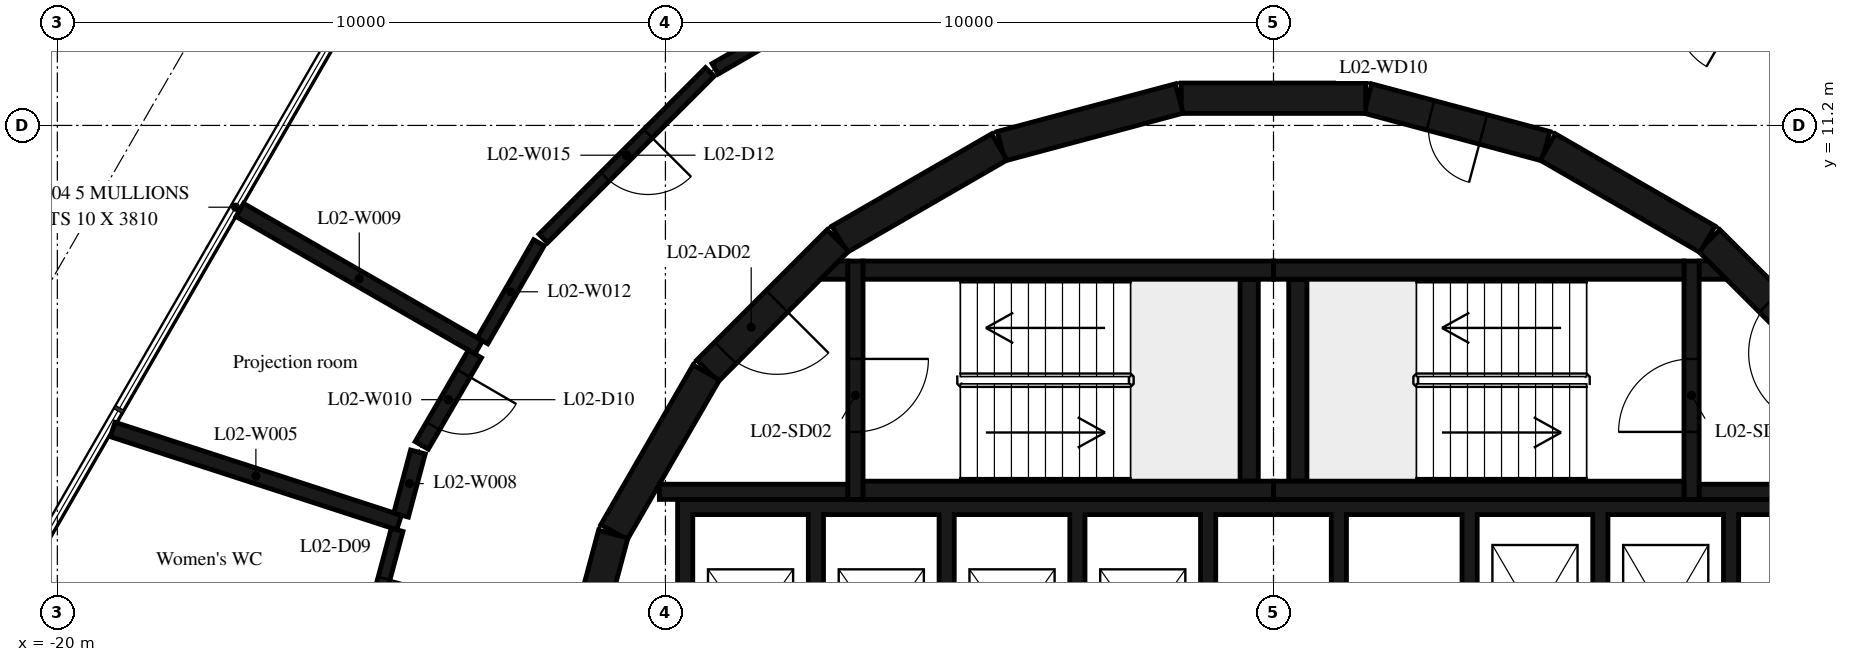
"""IFC4 building model, lengths in metres.
Left out: names, types, materials, properties, quantities, classifications, styles, units other than length and angle.
Written with IfcOpenShell. Run it as: python <this file> out.ifc"""

import sys

from ifc_helpers import new_model, si_unit, direction, frame, frame_2d, origin, place, context, subcontext, project, spatial, polyline, rectangle, outline, extrude, element, fill, save


model = new_model("IFC4")
c1 = context("Model", 3, precision=1e-05, world=origin(), true_north=direction((0.0, 1.0)))
c2 = subcontext(c1, "Body", "Model", "MODEL_VIEW")
j1 = project(units=[si_unit("LENGTHUNIT", "METRE"), si_unit("PLANEANGLEUNIT", "RADIAN")], contexts=[c1])
p1 = place(None, origin())
s1 = spatial("IfcSite", under=j1, at=p1, CompositionType="ELEMENT")
p2 = place(p1, origin())
s2 = spatial("IfcBuilding", under=s1, at=p2, CompositionType="ELEMENT")
p3 = place(p2, frame((0.0, 0.0, 13.8)))
s3 = spatial("IfcBuildingStorey", under=s2, at=p3, CompositionType="ELEMENT", Elevation=13.8)
p4 = place(p3, frame((9.308, 7.164, 0.0), z_axis=(0.0, 0.0, 1.0), x_axis=(-0.707106781187, 0.707106781187, 0.0)))
e1 = element("IfcWall", 1, at=p4, inside=s3, PredefinedType="SHEAR", context=c2, shape_type="SweptSolid", body=[
    extrude(rectangle(XDim=3.032, YDim=0.5, at=frame_2d((1.516, 0.0))), origin(), (0.0, 0.0, 1.0), 4.42),
])
p5 = place(p4, frame((0.416, 0.0, 0.0)))
e2 = element("IfcOpeningElement", 2, at=p5, cuts=e1, PredefinedType="OPENING", context=c2, shape_type="SweptSolid", body=[
    extrude(rectangle(XDim=1.2, YDim=2.1, at=frame_2d((0.6, 1.05))), frame((0.0, 0.26, 0.0), z_axis=(0.0, -1.0, 0.0), x_axis=(1.0, 0.0, 0.0)), (0.0, 0.0, 1.0), 0.52),
])
p6 = place(p3, frame((7.137, 9.329, 0.0), z_axis=(0.0, 0.0, 1.0), x_axis=(-0.865975092491, 0.500087131594, 0.0)))
e3 = element("IfcWall", 3, at=p6, inside=s3, PredefinedType="SHEAR", context=c2, shape_type="SweptSolid", body=[
    extrude(rectangle(XDim=3.033, YDim=0.5, at=frame_2d((1.516, 0.0))), origin(), (0.0, 0.0, 1.0), 4.42),
])
p7 = place(p3, frame((4.479, 10.858, 0.0), z_axis=(0.0, 0.0, 1.0), x_axis=(-0.965948410781, 0.258734743916, 0.0)))
e4 = element("IfcWall", 4, at=p7, inside=s3, PredefinedType="SHEAR", context=c2, shape_type="SweptSolid", body=[
    extrude(rectangle(XDim=3.033, YDim=0.5, at=frame_2d((1.516, 0.0))), origin(), (0.0, 0.0, 1.0), 4.42),
])
p8 = place(p7, frame((1.066, 0.0, 0.0)))
e5 = element("IfcOpeningElement", 5, at=p8, cuts=e4, PredefinedType="OPENING", context=c2, shape_type="SweptSolid", body=[
    extrude(rectangle(XDim=0.9, YDim=2.1, at=frame_2d((0.45, 1.05))), frame((0.0, 0.26, 0.0), z_axis=(0.0, -1.0, 0.0), x_axis=(1.0, 0.0, 0.0)), (0.0, 0.0, 1.0), 0.52),
])
for number, where, z_axis, x_axis in (
    (6, (1.516, 11.647, 0.0), (0.0, 0.0, 1.0), (-1.0, 0.0, 0.0)),
    (7, (-1.55, 11.643, 0.0), (0.0, 0.0, 1.0), (-0.966, -0.259, 0.0)),
    (8, (-4.51, 10.845, 0.0), (0.0, 0.0, 1.0), (-0.866, -0.5, 0.0)),
):
    element("IfcWall", number, at=place(p3, frame(where, z_axis=z_axis, x_axis=x_axis)), inside=s3, PredefinedType="SHEAR", context=c2, shape_type="SweptSolid", body=[
        extrude(rectangle(XDim=3.033, YDim=0.5, at=frame_2d((1.516, 0.0))), origin(), (0.0, 0.0, 1.0), 4.42),
    ])
p9 = place(p3, frame((-7.164, 9.308, 0.0), z_axis=(0.0, 0.0, 1.0), x_axis=(-0.707106781187, -0.707106781187, 0.0)))
e9 = element("IfcWall", 9, at=p9, inside=s3, PredefinedType="SHEAR", context=c2, shape_type="SweptSolid", body=[
    extrude(rectangle(XDim=3.032, YDim=0.5, at=frame_2d((1.516, 0.0))), origin(), (0.0, 0.0, 1.0), 4.42),
])
p10 = place(p9, frame((1.416, 0.0, 0.0)))
e10 = element("IfcOpeningElement", 10, at=p10, cuts=e9, PredefinedType="OPENING", context=c2, shape_type="SweptSolid", body=[
    extrude(rectangle(XDim=1.2, YDim=2.1, at=frame_2d((0.6, 1.05))), frame((0.0, 0.26, 0.0), z_axis=(0.0, -1.0, 0.0), x_axis=(1.0, 0.0, 0.0)), (0.0, 0.0, 1.0), 0.52),
])
for number, where, z_axis, x_axis in (
    (11, (-9.329, 7.137, 0.0), (0.0, 0.0, 1.0), (-0.5, -0.866, 0.0)),
    (12, (-10.858, 4.479, 0.0), (0.0, 0.0, 1.0), (-0.259, -0.966, 0.0)),
):
    element("IfcWall", number, at=place(p3, frame(where, z_axis=z_axis, x_axis=x_axis)), inside=s3, PredefinedType="SHEAR", context=c2, shape_type="SweptSolid", body=[
        extrude(rectangle(XDim=3.033, YDim=0.5, at=frame_2d((1.516, 0.0))), origin(), (0.0, 0.0, 1.0), 4.42),
    ])
for number, where, z_axis, x_axis in (
    (13, (0.0, 5.2, 0.0), (0.0, 0.0, 1.0), (1.0, 0.0, 0.0)),
    (14, (0.0, 8.82, 0.0), (0.0, 0.0, 1.0), (1.0, 0.0, 0.0)),
):
    element("IfcWall", number, at=place(p3, frame(where, z_axis=z_axis, x_axis=x_axis)), inside=s3, PredefinedType="SHEAR", context=c2, shape_type="SweptSolid", body=[
        extrude(rectangle(XDim=6.75, YDim=0.3, at=frame_2d((3.375, 0.0))), origin(), (0.0, 0.0, 1.0), 4.42),
    ])
p11 = place(p3, frame((0.4, 5.35, 0.0), z_axis=(0.0, 0.0, 1.0), x_axis=(0.0, 1.0, 0.0)))
e15 = element("IfcWall", 15, at=p11, inside=s3, PredefinedType="SHEAR", context=c2, shape_type="SweptSolid", body=[
    extrude(rectangle(XDim=3.32, YDim=0.3, at=frame_2d((1.66, 0.0))), origin(), (0.0, 0.0, 1.0), 4.42),
])
p12 = place(p3, frame((6.875, 5.05, 0.0), z_axis=(0.0, 0.0, 1.0), x_axis=(0.0, 1.0, 0.0)))
e16 = element("IfcWall", 16, at=p12, inside=s3, PredefinedType="SHEAR", context=c2, shape_type="SweptSolid", body=[
    extrude(rectangle(XDim=3.92, YDim=0.25, at=frame_2d((1.96, 0.0))), origin(), (0.0, 0.0, 1.0), 4.42),
])
p13 = place(p12, frame((1.11, 0.0, 0.0)))
e17 = element("IfcOpeningElement", 17, at=p13, cuts=e16, PredefinedType="OPENING", context=c2, shape_type="SweptSolid", body=[
    extrude(rectangle(XDim=1.2, YDim=2.1, at=frame_2d((0.6, 1.05))), frame((0.0, 0.135, 0.0), z_axis=(0.0, -1.0, 0.0), x_axis=(1.0, 0.0, 0.0)), (0.0, 0.0, 1.0), 0.27),
])
p14 = place(p3, frame((7.0, 5.175, 0.0), z_axis=(0.0, 0.0, 1.0), x_axis=(1.0, 0.0, 0.0)))
e18 = element("IfcWall", 18, at=p14, inside=s3, PredefinedType="SHEAR", context=c2, shape_type="SweptSolid", body=[
    extrude(rectangle(XDim=3.1, YDim=0.25, at=frame_2d((1.55, 0.0))), origin(), (0.0, 0.0, 1.0), 4.42),
])
p15 = place(p3, origin())
e19 = element("IfcWall", 19, at=p15, inside=s3, PredefinedType="SHEAR", context=c2, shape_type="SweptSolid", body=[
    extrude(outline(polyline([(7.448, 8.67), (7.0, 8.67), (7.0, 8.97), (7.148, 8.97), (7.448, 8.67)])), origin(), (0.0, 0.0, 1.0), 4.42),
])
for number, where, z_axis, x_axis in (
    (20, (-6.75, 5.2, 0.0), (0.0, 0.0, 1.0), (1.0, 0.0, 0.0)),
    (21, (-6.75, 8.82, 0.0), (0.0, 0.0, 1.0), (1.0, 0.0, 0.0)),
):
    element("IfcWall", number, at=place(p3, frame(where, z_axis=z_axis, x_axis=x_axis)), inside=s3, PredefinedType="SHEAR", context=c2, shape_type="SweptSolid", body=[
        extrude(rectangle(XDim=6.75, YDim=0.3, at=frame_2d((3.375, 0.0))), origin(), (0.0, 0.0, 1.0), 4.42),
    ])
p16 = place(p3, frame((-0.4, 5.35, 0.0), z_axis=(0.0, 0.0, 1.0), x_axis=(0.0, 1.0, 0.0)))
e22 = element("IfcWall", 22, at=p16, inside=s3, PredefinedType="SHEAR", context=c2, shape_type="SweptSolid", body=[
    extrude(rectangle(XDim=3.32, YDim=0.3, at=frame_2d((1.66, 0.0))), origin(), (0.0, 0.0, 1.0), 4.42),
])
p17 = place(p3, frame((-6.875, 8.97, 0.0), z_axis=(0.0, 0.0, 1.0), x_axis=(0.0, -1.0, 0.0)))
e23 = element("IfcWall", 23, at=p17, inside=s3, PredefinedType="SHEAR", context=c2, shape_type="SweptSolid", body=[
    extrude(rectangle(XDim=3.92, YDim=0.25, at=frame_2d((1.96, 0.0))), origin(), (0.0, 0.0, 1.0), 4.42),
])
p18 = place(p17, frame((1.61, 0.0, 0.0)))
e24 = element("IfcOpeningElement", 24, at=p18, cuts=e23, PredefinedType="OPENING", context=c2, shape_type="SweptSolid", body=[
    extrude(rectangle(XDim=1.2, YDim=2.1, at=frame_2d((0.6, 1.05))), frame((0.0, 0.135, 0.0), z_axis=(0.0, -1.0, 0.0), x_axis=(1.0, 0.0, 0.0)), (0.0, 0.0, 1.0), 0.27),
])
p19 = place(p3, frame((-7.0, 5.175, 0.0), z_axis=(0.0, 0.0, 1.0), x_axis=(-1.0, 0.0, 0.0)))
e25 = element("IfcWall", 25, at=p19, inside=s3, PredefinedType="SHEAR", context=c2, shape_type="SweptSolid", body=[
    extrude(rectangle(XDim=3.1, YDim=0.25, at=frame_2d((1.55, 0.0))), origin(), (0.0, 0.0, 1.0), 4.42),
])
p20 = place(p3, origin())
e26 = element("IfcWall", 26, at=p20, inside=s3, PredefinedType="SHEAR", context=c2, shape_type="SweptSolid", body=[
    extrude(outline(polyline([(-7.148, 8.97), (-7.0, 8.97), (-7.0, 8.67), (-7.448, 8.67), (-7.148, 8.97)])), origin(), (0.0, 0.0, 1.0), 4.42),
])
p21 = place(p3, origin())
e27 = element("IfcWall", 27, at=p21, inside=s3, PredefinedType="SHEAR", context=c2, shape_type="SweptSolid", body=[
    extrude(outline(polyline([(-9.55, 4.8), (-7.65, 4.8), (-7.65, 1.9), (-7.4, 1.9), (-7.4, 4.8), (-5.5, 4.8), (-5.5, 1.9), (-5.25, 1.9), (-5.25, 4.8), (-3.35, 4.8), (-3.35, 1.9), (-3.1, 1.9), (-3.1, 4.8), (-1.2, 4.8), (-1.2, 1.9), (-0.95, 1.9), (-0.95, 4.8), (0.95, 4.8), (0.95, 1.9), (1.2, 1.9), (1.2, 4.8), (3.1, 4.8), (3.1, 1.9), (3.35, 1.9), (3.35, 4.8), (5.25, 4.8), (5.25, 1.9), (5.5, 1.9), (5.5, 4.8), (7.4, 4.8), (7.4, 1.9), (7.65, 1.9), (7.65, 4.8), (9.55, 4.8), (9.55, 1.9), (9.8, 1.9), (9.8, 4.8), (9.8, 5.05), (-9.8, 5.05), (-9.8, 4.8), (-9.8, 1.9), (-9.55, 1.9), (-9.55, 4.8)])), origin(), (0.0, 0.0, 1.0), 4.42),
])
p22 = place(p3, frame((-14.38, 4.67, 0.0), z_axis=(0.0, 0.0, 1.0), x_axis=(-0.951080790776, 0.308942275219, 0.0)))
e28 = element("IfcWall", 28, at=p22, inside=s3, PredefinedType="PARTITIONING", context=c2, shape_type="SweptSolid", body=[
    extrude(rectangle(XDim=4.952, YDim=0.25, at=frame_2d((2.476, 0.0))), origin(), (0.0, 0.0, 1.0), 4.03),
])
p23 = place(p3, frame((-14.412, 4.549, 0.0), z_axis=(0.0, 0.0, 1.0), x_axis=(-0.25946184252, -0.965753359961, 0.0)))
e29 = element("IfcWall", 29, at=p23, inside=s3, PredefinedType="PARTITIONING", context=c2, shape_type="SweptSolid", body=[
    extrude(rectangle(XDim=2.55, YDim=0.2, at=frame_2d((1.275, 0.0))), origin(), (0.0, 0.0, 1.0), 4.42),
])
p24 = place(p23, frame((0.825, 0.0, 0.0)))
e30 = element("IfcOpeningElement", 30, at=p24, cuts=e29, PredefinedType="OPENING", context=c2, shape_type="SweptSolid", body=[
    extrude(rectangle(XDim=0.9, YDim=2.1, at=frame_2d((0.45, 1.05))), frame((0.0, 0.11, 0.0), z_axis=(0.0, -1.0, 0.0), x_axis=(1.0, 0.0, 0.0)), (0.0, 0.0, 1.0), 0.22),
])
p25 = place(p3, frame((-14.07, 5.83, 0.0), z_axis=(0.0, 0.0, 1.0), x_axis=(-0.258044022259, -0.966133159857, 0.0)))
e31 = element("IfcWall", 31, at=p25, inside=s3, PredefinedType="PARTITIONING", context=c2, shape_type="SweptSolid", body=[
    extrude(rectangle(XDim=1.076, YDim=0.25, at=frame_2d((0.538, 0.0))), origin(), (0.0, 0.0, 1.0), 4.42),
])
p26 = place(p3, frame((-13.07, 7.55, 0.0), z_axis=(0.0, 0.0, 1.0), x_axis=(-0.866877794005, 0.498520701938, 0.0)))
e32 = element("IfcWall", 32, at=p26, inside=s3, PredefinedType="PARTITIONING", context=c2, shape_type="SweptSolid", body=[
    extrude(rectangle(XDim=4.533, YDim=0.25, at=frame_2d((2.267, 0.0))), origin(), (0.0, 0.0, 1.0), 4.42),
])
p27 = place(p3, frame((-13.133, 7.442, 0.0), z_axis=(0.0, 0.0, 1.0), x_axis=(-0.502578988357, -0.864531295247, 0.0)))
e33 = element("IfcWall", 33, at=p27, inside=s3, PredefinedType="PARTITIONING", context=c2, shape_type="SweptSolid", body=[
    extrude(rectangle(XDim=1.74, YDim=0.25, at=frame_2d((0.87, 0.0))), origin(), (0.0, 0.0, 1.0), 4.42),
])
p28 = place(p27, frame((0.37, 0.0, 0.0)))
e34 = element("IfcOpeningElement", 34, at=p28, cuts=e33, PredefinedType="OPENING", context=c2, shape_type="SweptSolid", body=[
    extrude(rectangle(XDim=1.0, YDim=2.1, at=frame_2d((0.5, 1.05))), frame((0.0, 0.135, 0.0), z_axis=(0.0, -1.0, 0.0), x_axis=(1.0, 0.0, 0.0)), (0.0, 0.0, 1.0), 0.27),
])
p29 = place(p3, frame((-12.08, 9.27, 0.0), z_axis=(0.0, 0.0, 1.0), x_axis=(-0.498809049979, -0.86671190811, 0.0)))
e35 = element("IfcWall", 35, at=p29, inside=s3, PredefinedType="PARTITIONING", context=c2, shape_type="SweptSolid", body=[
    extrude(rectangle(XDim=1.859, YDim=0.2, at=frame_2d((0.93, 0.0))), origin(), (0.0, 0.0, 1.0), 4.42),
])
p30 = place(p3, frame((-9.27, 12.08, 0.0), z_axis=(0.0, 0.0, 1.0), x_axis=(-0.707106781187, -0.707106781187, 0.0)))
e36 = element("IfcWall", 36, at=p30, inside=s3, PredefinedType="PARTITIONING", context=c2, shape_type="SweptSolid", body=[
    extrude(rectangle(XDim=3.874, YDim=0.2, at=frame_2d((1.937, 0.0))), origin(), (0.0, 0.0, 1.0), 4.42),
])
p31 = place(p30, frame((1.437, 0.0, 0.0)))
e37 = element("IfcOpeningElement", 37, at=p31, cuts=e36, PredefinedType="OPENING", context=c2, shape_type="SweptSolid", body=[
    extrude(rectangle(XDim=1.0, YDim=2.1, at=frame_2d((0.5, 1.05))), frame((0.0, 0.11, 0.0), z_axis=(0.0, -1.0, 0.0), x_axis=(1.0, 0.0, 0.0)), (0.0, 0.0, 1.0), 0.22),
])
p32 = place(p3, frame((-5.917, 14.02, 0.0), z_axis=(0.0, 0.0, 1.0), x_axis=(-0.865591582237, -0.500750649286, 0.0)))
e38 = element("IfcWall", 38, at=p32, inside=s3, PredefinedType="PARTITIONING", context=c2, shape_type="SweptSolid", body=[
    extrude(rectangle(XDim=3.774, YDim=0.2, at=frame_2d((1.887, 0.0))), origin(), (0.0, 0.0, 1.0), 4.42),
])
p33 = place(p13, origin())
e39 = element("IfcDoor", 39, at=p33, inside=s3, OperationType="SINGLE_SWING_LEFT", PredefinedType="DOOR", context=c2, shape_type="SweptSolid", body=[
    extrude(rectangle(XDim=1.2, YDim=2.1, at=frame_2d((0.6, 1.05))), frame((0.0, 0.025, 0.0), z_axis=(0.0, -1.0, 0.0), x_axis=(1.0, 0.0, 0.0)), (0.0, 0.0, 1.0), 0.05),
])
fill(e17, e39)
p34 = place(p5, origin())
e40 = element("IfcDoor", 40, at=p34, inside=s3, OperationType="SINGLE_SWING_RIGHT", PredefinedType="DOOR", context=c2, shape_type="SweptSolid", body=[
    extrude(rectangle(XDim=1.2, YDim=2.1, at=frame_2d((0.6, 1.05))), frame((0.0, 0.025, 0.0), z_axis=(0.0, -1.0, 0.0), x_axis=(1.0, 0.0, 0.0)), (0.0, 0.0, 1.0), 0.05),
])
fill(e2, e40)
p35 = place(p18, origin())
e41 = element("IfcDoor", 41, at=p35, inside=s3, OperationType="SINGLE_SWING_LEFT", PredefinedType="DOOR", context=c2, shape_type="SweptSolid", body=[
    extrude(rectangle(XDim=1.2, YDim=2.1, at=frame_2d((0.6, 1.05))), frame((0.0, 0.025, 0.0), z_axis=(0.0, -1.0, 0.0), x_axis=(1.0, 0.0, 0.0)), (0.0, 0.0, 1.0), 0.05),
])
fill(e24, e41)
p36 = place(p10, origin())
e42 = element("IfcDoor", 42, at=p36, inside=s3, OperationType="SINGLE_SWING_RIGHT", PredefinedType="DOOR", context=c2, shape_type="SweptSolid", body=[
    extrude(rectangle(XDim=1.2, YDim=2.1, at=frame_2d((0.6, 1.05))), frame((0.0, 0.025, 0.0), z_axis=(0.0, -1.0, 0.0), x_axis=(1.0, 0.0, 0.0)), (0.0, 0.0, 1.0), 0.05),
])
fill(e10, e42)
p37 = place(p8, origin())
e43 = element("IfcDoor", 43, at=p37, inside=s3, OperationType="SINGLE_SWING_LEFT", PredefinedType="DOOR", context=c2, shape_type="SweptSolid", body=[
    extrude(rectangle(XDim=0.9, YDim=2.1, at=frame_2d((0.45, 1.05))), frame((0.0, 0.025, 0.0), z_axis=(0.0, -1.0, 0.0), x_axis=(1.0, 0.0, 0.0)), (0.0, 0.0, 1.0), 0.05),
])
fill(e5, e43)
p38 = place(p24, origin())
e44 = element("IfcDoor", 44, at=p38, inside=s3, OperationType="SINGLE_SWING_LEFT", PredefinedType="DOOR", context=c2, shape_type="SweptSolid", body=[
    extrude(rectangle(XDim=0.9, YDim=2.1, at=frame_2d((0.45, 1.05))), frame((0.0, 0.025, 0.0), z_axis=(0.0, -1.0, 0.0), x_axis=(1.0, 0.0, 0.0)), (0.0, 0.0, 1.0), 0.05),
])
fill(e30, e44)
p39 = place(p28, origin())
e45 = element("IfcDoor", 45, at=p39, inside=s3, OperationType="SINGLE_SWING_LEFT", PredefinedType="DOOR", context=c2, shape_type="SweptSolid", body=[
    extrude(rectangle(XDim=1.0, YDim=2.1, at=frame_2d((0.5, 1.05))), frame((0.0, 0.025, 0.0), z_axis=(0.0, -1.0, 0.0), x_axis=(1.0, 0.0, 0.0)), (0.0, 0.0, 1.0), 0.05),
])
fill(e34, e45)
p40 = place(p31, origin())
e46 = element("IfcDoor", 46, at=p40, inside=s3, OperationType="SINGLE_SWING_LEFT", PredefinedType="DOOR", context=c2, shape_type="SweptSolid", body=[
    extrude(rectangle(XDim=1.0, YDim=2.1, at=frame_2d((0.5, 1.05))), frame((0.0, 0.025, 0.0), z_axis=(0.0, -1.0, 0.0), x_axis=(1.0, 0.0, 0.0)), (0.0, 0.0, 1.0), 0.05),
])
fill(e37, e46)
save(model, sys.argv[1])
